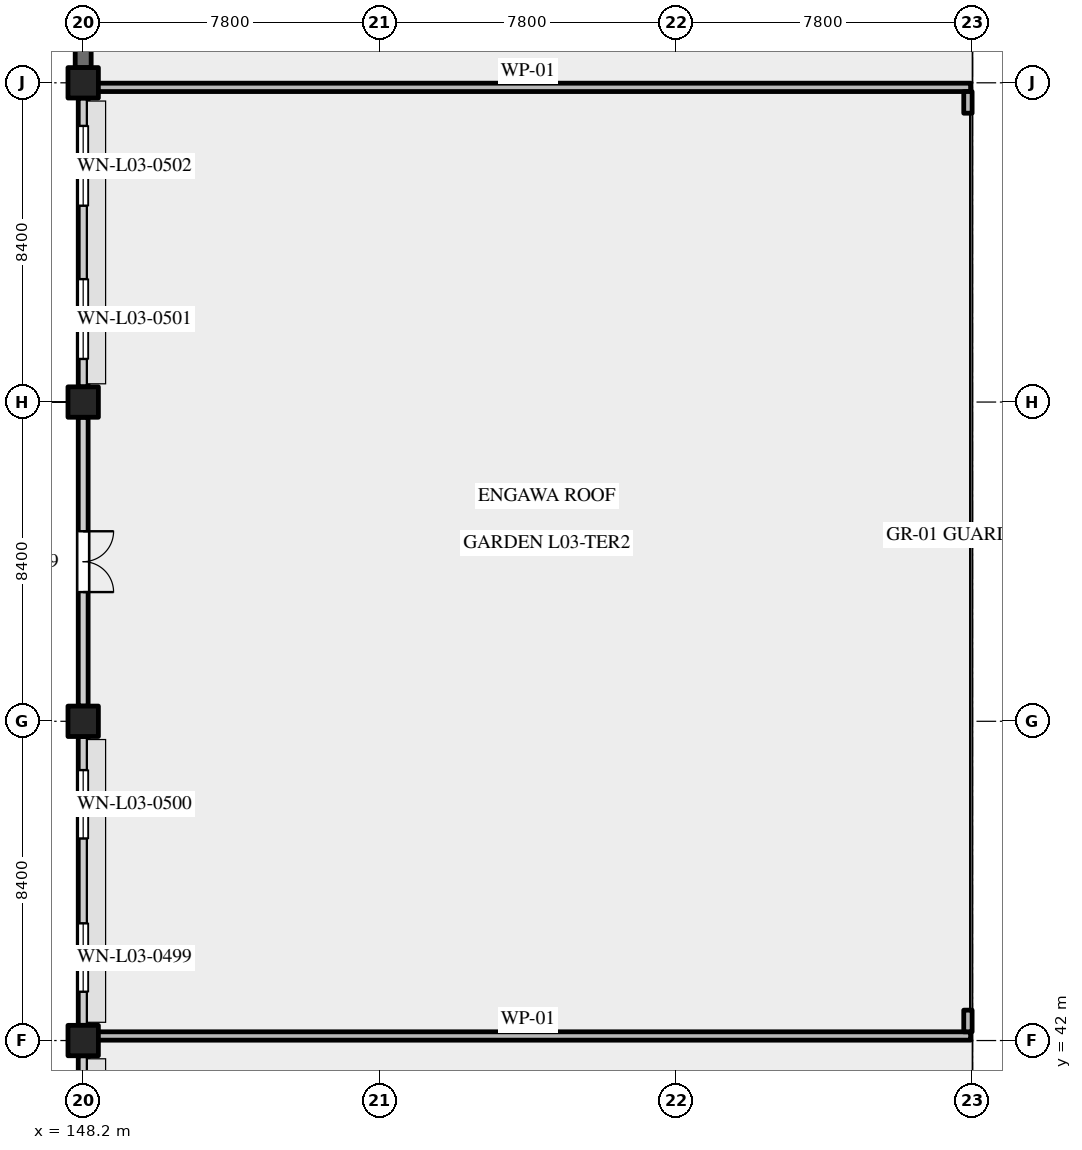
"""IFC4 building model, lengths in metres.
Left out: names, types, materials, properties, quantities, classifications, styles, units other than length and angle.
Written with IfcOpenShell. Run it as: python <this file> out.ifc"""

import sys

from ifc_helpers import new_model, si_unit, direction, frame, frame_2d, origin, origin_2d, place, context, subcontext, project, spatial, rectangle, extrude, element, fill, save


model = new_model("IFC4")
c1 = context("Model", 3, precision=1e-05, world=origin(), true_north=direction((0.0, 1.0)))
c2 = subcontext(c1, "Body", "Model", "MODEL_VIEW")
j1 = project(units=[si_unit("LENGTHUNIT", "METRE"), si_unit("PLANEANGLEUNIT", "RADIAN")], contexts=[c1])
p1 = place(None, origin())
s1 = spatial("IfcSite", under=j1, at=p1, CompositionType="ELEMENT")
p2 = place(p1, origin())
s2 = spatial("IfcBuilding", under=s1, at=p2, CompositionType="ELEMENT")
p3 = place(p2, frame((0.0, 0.0, 14.4)))
s3 = spatial("IfcBuildingStorey", under=s2, at=p3, CompositionType="ELEMENT", Elevation=14.4)
for number, where, z_axis, x_axis in (
    (1, (148.2, 42.0, 0.0), (0.0, 0.0, 1.0), (1.0, 0.0, 0.0)),
    (2, (148.2, 50.4, 0.0), (0.0, 0.0, 1.0), (1.0, 0.0, 0.0)),
    (3, (148.2, 58.8, 0.0), (0.0, 0.0, 1.0), (1.0, 0.0, 0.0)),
    (4, (148.2, 67.2, 0.0), (0.0, 0.0, 1.0), (1.0, 0.0, 0.0)),
):
    element("IfcColumn", number, at=place(p3, frame(where, z_axis=z_axis, x_axis=x_axis)), inside=s3, PredefinedType="COLUMN", context=c2, shape_type="SweptSolid", body=[
        extrude(rectangle(XDim=0.8, YDim=0.8, at=origin_2d()), origin(), (0.0, 0.0, 1.0), 3.6),
    ])
p4 = place(p3, frame((148.2, 34.0, 0.0), z_axis=(0.0, 0.0, 1.0), x_axis=(0.0, 1.0, 0.0)))
e5 = element("IfcWall", 5, at=p4, inside=s3, PredefinedType="STANDARD", context=c2, shape_type="SweptSolid", body=[
    extrude(rectangle(XDim=7.6, YDim=0.26, at=frame_2d((3.8, 0.0))), origin(), (0.0, 0.0, 1.0), 2.62),
])
p5 = place(p4, frame((0.784, 0.0, 0.8)))
e6 = element("IfcOpeningElement", 6, at=p5, cuts=e5, PredefinedType="OPENING", context=c2, shape_type="SweptSolid", body=[
    extrude(rectangle(XDim=2.0, YDim=1.45, at=frame_2d((1.0, 0.725))), frame((0.0, 0.142, 0.0), z_axis=(0.0, -1.0, 0.0), x_axis=(1.0, 0.0, 0.0)), (0.0, 0.0, 1.0), 0.284),
])
p6 = place(p4, frame((4.816, 0.0, 0.8)))
e7 = element("IfcOpeningElement", 7, at=p6, cuts=e5, PredefinedType="OPENING", context=c2, shape_type="SweptSolid", body=[
    extrude(rectangle(XDim=2.0, YDim=1.45, at=frame_2d((1.0, 0.725))), frame((0.0, 0.142, 0.0), z_axis=(0.0, -1.0, 0.0), x_axis=(1.0, 0.0, 0.0)), (0.0, 0.0, 1.0), 0.284),
])
p7 = place(p3, frame((148.2, 42.4, 0.0), z_axis=(0.0, 0.0, 1.0), x_axis=(0.0, 1.0, 0.0)))
e8 = element("IfcWall", 8, at=p7, inside=s3, PredefinedType="STANDARD", context=c2, shape_type="SweptSolid", body=[
    extrude(rectangle(XDim=7.6, YDim=0.26, at=frame_2d((3.8, 0.0))), origin(), (0.0, 0.0, 1.0), 2.62),
])
p8 = place(p7, frame((0.884, 0.0, 0.8)))
e9 = element("IfcOpeningElement", 9, at=p8, cuts=e8, PredefinedType="OPENING", context=c2, shape_type="SweptSolid", body=[
    extrude(rectangle(XDim=1.8, YDim=1.55, at=frame_2d((0.9, 0.775))), frame((0.0, 0.142, 0.0), z_axis=(0.0, -1.0, 0.0), x_axis=(1.0, 0.0, 0.0)), (0.0, 0.0, 1.0), 0.284),
])
p9 = place(p7, frame((4.916, 0.0, 0.8)))
e10 = element("IfcOpeningElement", 10, at=p9, cuts=e8, PredefinedType="OPENING", context=c2, shape_type="SweptSolid", body=[
    extrude(rectangle(XDim=1.8, YDim=1.55, at=frame_2d((0.9, 0.775))), frame((0.0, 0.142, 0.0), z_axis=(0.0, -1.0, 0.0), x_axis=(1.0, 0.0, 0.0)), (0.0, 0.0, 1.0), 0.284),
])
p10 = place(p3, frame((148.2, 50.8, 0.0), z_axis=(0.0, 0.0, 1.0), x_axis=(0.0, 1.0, 0.0)))
e11 = element("IfcWall", 11, at=p10, inside=s3, PredefinedType="STANDARD", context=c2, shape_type="SweptSolid", body=[
    extrude(rectangle(XDim=7.6, YDim=0.26, at=frame_2d((3.8, 0.0))), origin(), (0.0, 0.0, 1.0), 2.62),
])
p11 = place(p10, frame((3.0, 0.0, 0.0)))
e12 = element("IfcOpeningElement", 12, at=p11, cuts=e11, PredefinedType="OPENING", context=c2, shape_type="SweptSolid", body=[
    extrude(rectangle(XDim=1.6, YDim=2.15, at=frame_2d((0.8, 1.075))), frame((0.0, 0.142, 0.0), z_axis=(0.0, -1.0, 0.0), x_axis=(1.0, 0.0, 0.0)), (0.0, 0.0, 1.0), 0.284),
])
p12 = place(p3, frame((148.2, 59.2, 0.0), z_axis=(0.0, 0.0, 1.0), x_axis=(0.0, 1.0, 0.0)))
e13 = element("IfcWall", 13, at=p12, inside=s3, PredefinedType="STANDARD", context=c2, shape_type="SweptSolid", body=[
    extrude(rectangle(XDim=7.6, YDim=0.26, at=frame_2d((3.8, 0.0))), origin(), (0.0, 0.0, 1.0), 2.62),
])
p13 = place(p12, frame((0.734, 0.0, 0.8)))
e14 = element("IfcOpeningElement", 14, at=p13, cuts=e13, PredefinedType="OPENING", context=c2, shape_type="SweptSolid", body=[
    extrude(rectangle(XDim=2.1, YDim=1.55, at=frame_2d((1.05, 0.775))), frame((0.0, 0.142, 0.0), z_axis=(0.0, -1.0, 0.0), x_axis=(1.0, 0.0, 0.0)), (0.0, 0.0, 1.0), 0.284),
])
p14 = place(p12, frame((4.766, 0.0, 0.8)))
e15 = element("IfcOpeningElement", 15, at=p14, cuts=e13, PredefinedType="OPENING", context=c2, shape_type="SweptSolid", body=[
    extrude(rectangle(XDim=2.1, YDim=1.55, at=frame_2d((1.05, 0.775))), frame((0.0, 0.142, 0.0), z_axis=(0.0, -1.0, 0.0), x_axis=(1.0, 0.0, 0.0)), (0.0, 0.0, 1.0), 0.284),
])
p15 = place(p3, frame((148.2, 67.6, 0.0), z_axis=(0.0, 0.0, 1.0), x_axis=(0.0, 1.0, 0.0)))
e16 = element("IfcWall", 16, at=p15, inside=s3, PredefinedType="SOLIDWALL", context=c2, shape_type="SweptSolid", body=[
    extrude(rectangle(XDim=7.6, YDim=0.42, at=frame_2d((3.8, 0.0))), origin(), (0.0, 0.0, 1.0), 2.62),
])
p16 = place(p15, frame((3.35, 0.0, 0.8)))
e17 = element("IfcOpeningElement", 17, at=p16, cuts=e16, PredefinedType="OPENING", context=c2, shape_type="SweptSolid", body=[
    extrude(rectangle(XDim=0.9, YDim=1.3, at=frame_2d((0.45, 0.65))), frame((0.0, 0.222, 0.0), z_axis=(0.0, -1.0, 0.0), x_axis=(1.0, 0.0, 0.0)), (0.0, 0.0, 1.0), 0.444),
])
for number, where, z_axis, x_axis in (
    (18, (148.25, 42.12, 0.0), (0.0, 0.0, 1.0), (1.0, 0.0, 0.0)),
    (19, (148.25, 67.08, 0.0), (0.0, 0.0, 1.0), (1.0, 0.0, 0.0)),
):
    element("IfcWall", number, at=place(p3, frame(where, z_axis=z_axis, x_axis=x_axis)), inside=s3, PredefinedType="PARAPET", context=c2, shape_type="SweptSolid", body=[
        extrude(rectangle(XDim=23.3, YDim=0.22, at=frame_2d((11.65, 0.0))), origin(), (0.0, 0.0, 1.0), 1.15),
    ])
for number, where, z_axis, x_axis in (
    (20, (171.48, 42.23, 0.0), (0.0, 0.0, 1.0), (0.0, 1.0, 0.0)),
    (21, (171.48, 66.4, 0.0), (0.0, 0.0, 1.0), (0.0, 1.0, 0.0)),
):
    element("IfcWall", number, at=place(p3, frame(where, z_axis=z_axis, x_axis=x_axis)), inside=s3, PredefinedType="PARAPET", context=c2, shape_type="SweptSolid", body=[
        extrude(rectangle(XDim=0.57, YDim=0.22, at=frame_2d((0.285, 0.0))), origin(), (0.0, 0.0, 1.0), 1.15),
    ])
p17 = place(p8, origin())
e22 = element("IfcWindow", 22, at=p17, inside=s3, PartitioningType="DOUBLE_PANEL_VERTICAL", PredefinedType="WINDOW", context=c2, shape_type="SweptSolid", body=[
    extrude(rectangle(XDim=1.8, YDim=1.55, at=frame_2d((0.9, 0.775))), frame((0.0, 0.03, 0.0), z_axis=(0.0, -1.0, 0.0), x_axis=(1.0, 0.0, 0.0)), (0.0, 0.0, 1.0), 0.06),
])
fill(e9, e22)
p18 = place(p9, origin())
e23 = element("IfcWindow", 23, at=p18, inside=s3, PartitioningType="DOUBLE_PANEL_VERTICAL", PredefinedType="WINDOW", context=c2, shape_type="SweptSolid", body=[
    extrude(rectangle(XDim=1.8, YDim=1.55, at=frame_2d((0.9, 0.775))), frame((0.0, 0.03, 0.0), z_axis=(0.0, -1.0, 0.0), x_axis=(1.0, 0.0, 0.0)), (0.0, 0.0, 1.0), 0.06),
])
fill(e10, e23)
p19 = place(p11, frame((1.6, 0.0, 0.0), z_axis=(0.0, 0.0, 1.0), x_axis=(-1.0, 0.0, 0.0)))
e24 = element("IfcDoor", 24, at=p19, inside=s3, OperationType="DOUBLE_DOOR_SINGLE_SWING", PredefinedType="DOOR", context=c2, shape_type="SweptSolid", body=[
    extrude(rectangle(XDim=1.6, YDim=2.15, at=frame_2d((0.8, 1.075))), frame((0.0, 0.025, 0.0), z_axis=(0.0, -1.0, 0.0), x_axis=(1.0, 0.0, 0.0)), (0.0, 0.0, 1.0), 0.05),
])
fill(e12, e24)
p20 = place(p13, origin())
e25 = element("IfcWindow", 25, at=p20, inside=s3, PartitioningType="DOUBLE_PANEL_VERTICAL", PredefinedType="WINDOW", context=c2, shape_type="SweptSolid", body=[
    extrude(rectangle(XDim=2.1, YDim=1.55, at=frame_2d((1.05, 0.775))), frame((0.0, 0.03, 0.0), z_axis=(0.0, -1.0, 0.0), x_axis=(1.0, 0.0, 0.0)), (0.0, 0.0, 1.0), 0.06),
])
fill(e14, e25)
p21 = place(p14, origin())
e26 = element("IfcWindow", 26, at=p21, inside=s3, PartitioningType="DOUBLE_PANEL_VERTICAL", PredefinedType="WINDOW", context=c2, shape_type="SweptSolid", body=[
    extrude(rectangle(XDim=2.1, YDim=1.55, at=frame_2d((1.05, 0.775))), frame((0.0, 0.03, 0.0), z_axis=(0.0, -1.0, 0.0), x_axis=(1.0, 0.0, 0.0)), (0.0, 0.0, 1.0), 0.06),
])
fill(e15, e26)
save(model, sys.argv[1])
